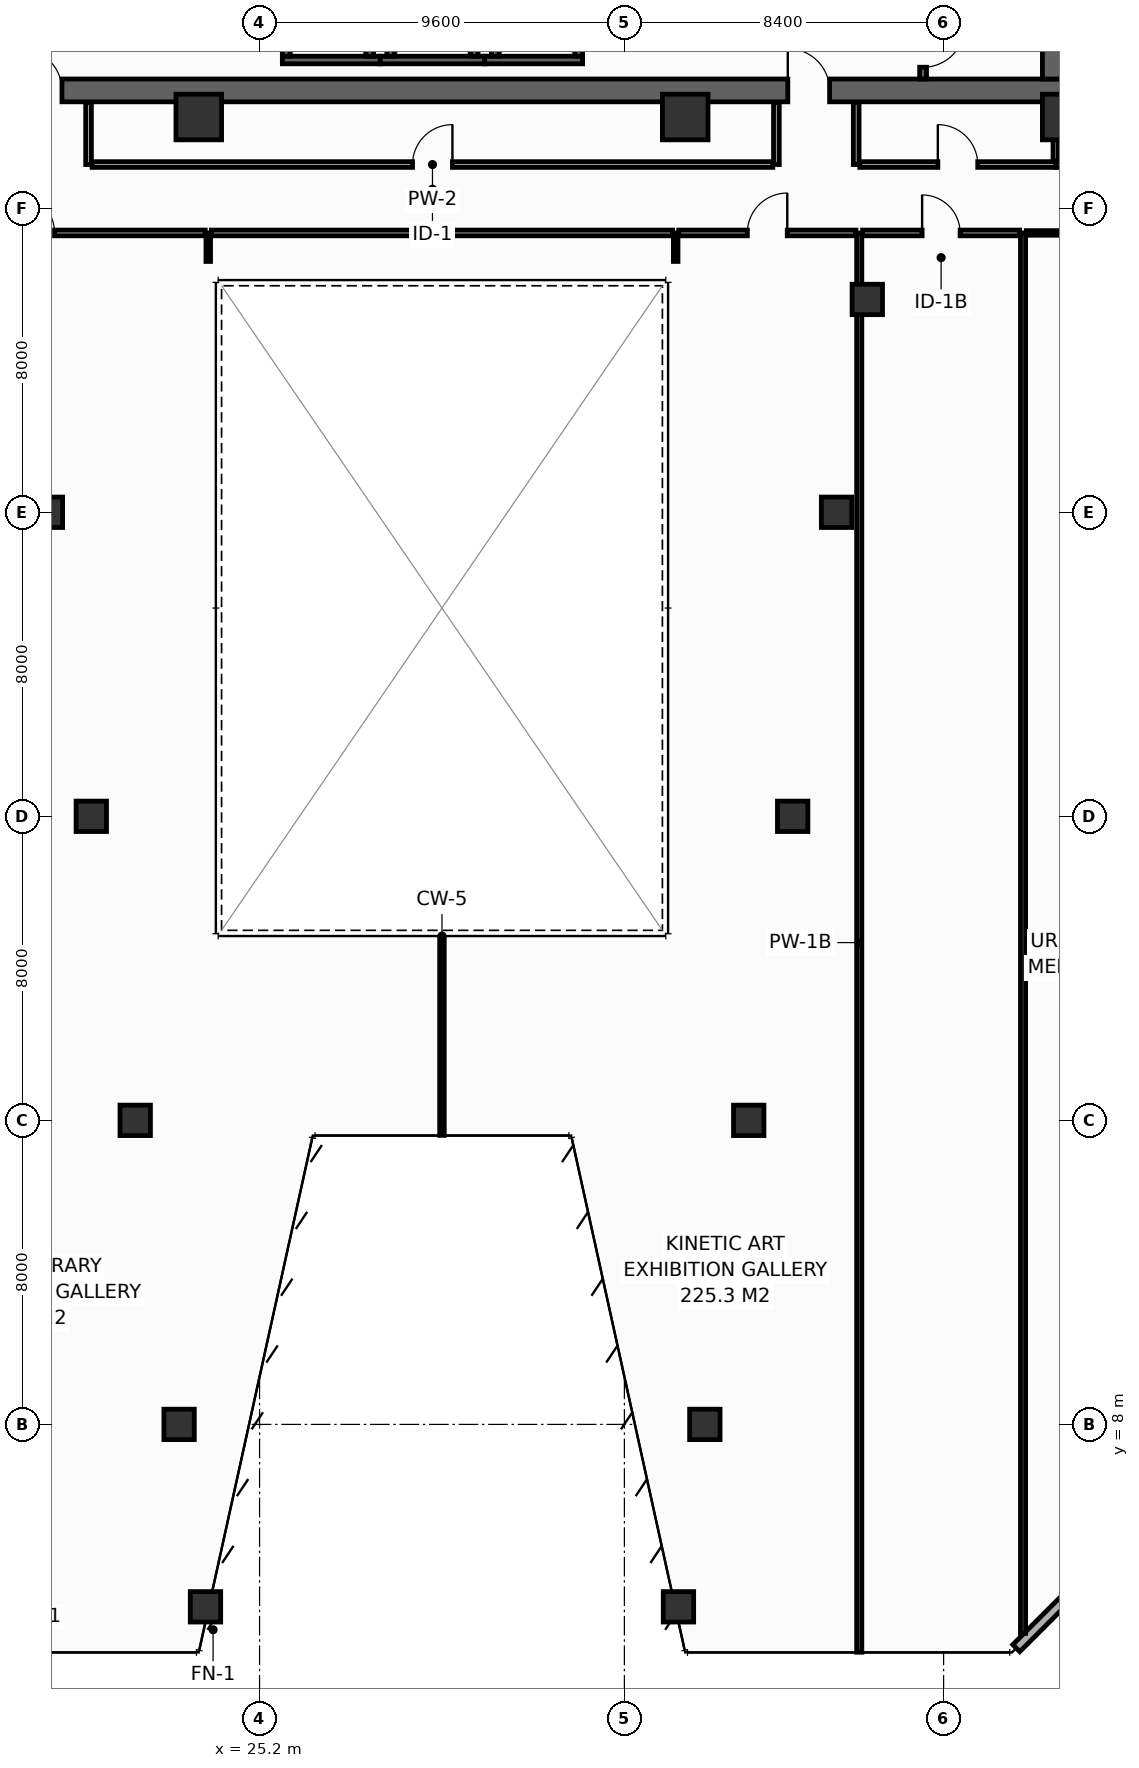
"""IFC4 building model, lengths in metres.
Left out: names, types, materials, properties, quantities, classifications, styles, units other than length and angle.
Written with IfcOpenShell. Run it as: python <this file> out.ifc"""

import sys

from ifc_helpers import new_model, si_unit, direction, frame, frame_2d, origin, origin_2d, place, context, subcontext, project, spatial, rectangle, hollow_rectangle, extrude, element, fill, save


model = new_model("IFC4")
c1 = context("Model", 3, precision=1e-05, world=origin(), true_north=direction((0.0, 1.0)))
c2 = subcontext(c1, "Body", "Model", "MODEL_VIEW")
j1 = project(units=[si_unit("LENGTHUNIT", "METRE"), si_unit("PLANEANGLEUNIT", "RADIAN")], contexts=[c1])
p1 = place(None, origin())
s1 = spatial("IfcSite", under=j1, at=p1, CompositionType="ELEMENT")
p2 = place(p1, origin())
s2 = spatial("IfcBuilding", under=s1, at=p2, CompositionType="ELEMENT")
p3 = place(p2, frame((0.0, 0.0, 56.0)))
s3 = spatial("IfcBuildingStorey", under=s2, at=p3, CompositionType="ELEMENT", Elevation=56.0)
p4 = place(p3, frame((13.5, 43.1, 0.0), z_axis=(0.0, 0.0, 1.0), x_axis=(1.0, 0.0, 0.0)))
e1 = element("IfcWall", 1, at=p4, inside=s3, PredefinedType="SHEAR", context=c2, shape_type="SweptSolid", body=[
    extrude(rectangle(XDim=32.9, YDim=0.6, at=frame_2d((16.45, 0.0))), origin(), (0.0, 0.0, 1.0), 4.15),
])
p5 = place(p4, frame((5.4, 0.0, 0.0)))
e2 = element("IfcOpeningElement", 2, at=p5, cuts=e1, PredefinedType="OPENING", context=c2, shape_type="SweptSolid", body=[
    extrude(rectangle(XDim=1.1, YDim=2.15, at=frame_2d((0.55, 1.075))), frame((0.0, 0.31, 0.0), z_axis=(0.0, -1.0, 0.0), x_axis=(1.0, 0.0, 0.0)), (0.0, 0.0, 1.0), 0.62),
])
p6 = place(p4, frame((25.6, 0.0, 0.0)))
e3 = element("IfcOpeningElement", 3, at=p6, cuts=e1, PredefinedType="OPENING", context=c2, shape_type="SweptSolid", body=[
    extrude(rectangle(XDim=1.1, YDim=2.15, at=frame_2d((0.55, 1.075))), frame((0.0, 0.31, 0.0), z_axis=(0.0, -1.0, 0.0), x_axis=(1.0, 0.0, 0.0)), (0.0, 0.0, 1.0), 0.62),
])
p7 = place(p3, frame((46.1, 43.4, 0.0), z_axis=(0.0, 0.0, 1.0), x_axis=(0.0, 1.0, 0.0)))
e4 = element("IfcWall", 4, at=p7, inside=s3, PredefinedType="SHEAR", context=c2, shape_type="SweptSolid", body=[
    extrude(rectangle(XDim=10.4, YDim=0.6, at=frame_2d((5.2, 0.0))), origin(), (0.0, 0.0, 1.0), 4.15),
])
for number, where, z_axis, x_axis in (
    (5, (23.6, 42.4, 0.0), (0.0, 0.0, 1.0), (1.0, 0.0, 0.0)),
    (6, (36.4, 42.4, 0.0), (0.0, 0.0, 1.0), (1.0, 0.0, 0.0)),
    (7, (46.4, 42.4, 0.0), (0.0, 0.0, 1.0), (1.0, 0.0, 0.0)),
):
    element("IfcColumn", number, at=place(p3, frame(where, z_axis=z_axis, x_axis=x_axis)), inside=s3, PredefinedType="COLUMN", context=c2, shape_type="SweptSolid", body=[
        extrude(hollow_rectangle(XDim=1.2, YDim=1.2, WallThickness=0.055, at=origin_2d()), origin(), (0.0, 0.0, 1.0), 4.4),
    ])
for number, where, z_axis, x_axis in (
    (8, (23.777, 3.2, 0.0), (0.0, 0.0, 1.0), (1.0, 0.0, 0.0)),
    (9, (36.223, 3.2, 0.0), (0.0, 0.0, 1.0), (1.0, 0.0, 0.0)),
    (10, (23.083, 8.0, 0.0), (0.0, 0.0, 1.0), (1.0, 0.0, 0.0)),
    (11, (36.917, 8.0, 0.0), (0.0, 0.0, 1.0), (1.0, 0.0, 0.0)),
    (12, (21.928, 16.0, 0.0), (0.0, 0.0, 1.0), (1.0, 0.0, 0.0)),
    (13, (38.072, 16.0, 0.0), (0.0, 0.0, 1.0), (1.0, 0.0, 0.0)),
    (14, (20.772, 24.0, 0.0), (0.0, 0.0, 1.0), (1.0, 0.0, 0.0)),
    (15, (39.228, 24.0, 0.0), (0.0, 0.0, 1.0), (1.0, 0.0, 0.0)),
    (16, (19.617, 32.0, 0.0), (0.0, 0.0, 1.0), (1.0, 0.0, 0.0)),
    (17, (40.383, 32.0, 0.0), (0.0, 0.0, 1.0), (1.0, 0.0, 0.0)),
    (18, (41.192, 37.6, 0.0), (0.0, 0.0, 1.0), (1.0, 0.0, 0.0)),
):
    element("IfcColumn", number, at=place(p3, frame(where, z_axis=z_axis, x_axis=x_axis)), inside=s3, PredefinedType="COLUMN", context=c2, shape_type="SweptSolid", body=[
        extrude(hollow_rectangle(XDim=0.8, YDim=0.8, WallThickness=0.036, at=origin_2d()), origin(), (0.0, 0.0, 1.0), 4.4),
    ])
p8 = place(p3, frame((25.8, 43.9, 0.0), z_axis=(0.0, 0.0, 1.0), x_axis=(1.0, 0.0, 0.0)))
e19 = element("IfcWall", 19, at=p8, inside=s3, PredefinedType="SHEAR", context=c2, shape_type="SweptSolid", body=[
    extrude(rectangle(XDim=2.575, YDim=0.2, at=frame_2d((1.288, 0.0))), origin(), (0.0, 0.0, 1.0), 4.15),
])
for number, where, z_axis, x_axis in (
    (20, (25.9, 44.0, 0.0), (0.0, 0.0, 1.0), (0.0, 1.0, 0.0)),
    (21, (28.1, 44.0, 0.0), (0.0, 0.0, 1.0), (0.0, 1.0, 0.0)),
):
    element("IfcWall", number, at=place(p3, frame(where, z_axis=z_axis, x_axis=x_axis)), inside=s3, PredefinedType="SHEAR", context=c2, shape_type="SweptSolid", body=[
        extrude(rectangle(XDim=2.3, YDim=0.2, at=frame_2d((1.15, 0.0))), origin(), (0.0, 0.0, 1.0), 4.15),
    ])
p9 = place(p3, frame((28.375, 43.9, 0.0), z_axis=(0.0, 0.0, 1.0), x_axis=(1.0, 0.0, 0.0)))
e22 = element("IfcWall", 22, at=p9, inside=s3, PredefinedType="SHEAR", context=c2, shape_type="SweptSolid", body=[
    extrude(rectangle(XDim=2.75, YDim=0.2, at=frame_2d((1.375, 0.0))), origin(), (0.0, 0.0, 1.0), 4.15),
])
for number, where, z_axis, x_axis in (
    (23, (28.65, 44.0, 0.0), (0.0, 0.0, 1.0), (0.0, 1.0, 0.0)),
    (24, (30.85, 44.0, 0.0), (0.0, 0.0, 1.0), (0.0, 1.0, 0.0)),
):
    element("IfcWall", number, at=place(p3, frame(where, z_axis=z_axis, x_axis=x_axis)), inside=s3, PredefinedType="SHEAR", context=c2, shape_type="SweptSolid", body=[
        extrude(rectangle(XDim=2.3, YDim=0.2, at=frame_2d((1.15, 0.0))), origin(), (0.0, 0.0, 1.0), 4.15),
    ])
p10 = place(p3, frame((31.125, 43.9, 0.0), z_axis=(0.0, 0.0, 1.0), x_axis=(1.0, 0.0, 0.0)))
e25 = element("IfcWall", 25, at=p10, inside=s3, PredefinedType="SHEAR", context=c2, shape_type="SweptSolid", body=[
    extrude(rectangle(XDim=2.575, YDim=0.2, at=frame_2d((1.288, 0.0))), origin(), (0.0, 0.0, 1.0), 4.15),
])
for number, where, z_axis, x_axis in (
    (26, (31.4, 44.0, 0.0), (0.0, 0.0, 1.0), (0.0, 1.0, 0.0)),
    (27, (33.6, 44.0, 0.0), (0.0, 0.0, 1.0), (0.0, 1.0, 0.0)),
):
    element("IfcWall", number, at=place(p3, frame(where, z_axis=z_axis, x_axis=x_axis)), inside=s3, PredefinedType="SHEAR", context=c2, shape_type="SweptSolid", body=[
        extrude(rectangle(XDim=2.3, YDim=0.2, at=frame_2d((1.15, 0.0))), origin(), (0.0, 0.0, 1.0), 4.15),
    ])
p11 = place(p3, frame((42.66, 53.8, 0.0), z_axis=(0.0, 0.0, 1.0), x_axis=(0.0, -1.0, 0.0)))
e28 = element("IfcWall", 28, at=p11, inside=s3, PredefinedType="SHEAR", context=c2, shape_type="SweptSolid", body=[
    extrude(rectangle(XDim=10.4, YDim=0.18, at=frame_2d((5.2, 0.0))), origin(), (0.0, 0.0, 1.0), 4.15),
])
p12 = place(p11, frame((8.99, 0.0, 0.0)))
e29 = element("IfcOpeningElement", 29, at=p12, cuts=e28, PredefinedType="OPENING", context=c2, shape_type="SweptSolid", body=[
    extrude(rectangle(XDim=1.1, YDim=2.15, at=frame_2d((0.55, 1.075))), frame((0.0, 0.1, 0.0), z_axis=(0.0, -1.0, 0.0), x_axis=(1.0, 0.0, 0.0)), (0.0, 0.0, 1.0), 0.2),
])
p13 = place(p3, frame((45.113, 2.113, 0.0), z_axis=(0.0, 0.0, 1.0), x_axis=(0.707106781187, 0.707106781187, 0.0)))
e30 = element("IfcWall", 30, at=p13, inside=s3, PredefinedType="STANDARD", context=c2, shape_type="SweptSolid", body=[
    extrude(rectangle(XDim=4.206, YDim=0.26, at=frame_2d((2.103, 0.0))), origin(), (0.0, 0.0, 1.0), 4.15),
])
p14 = place(p3, frame((46.15, 41.15, 0.0), z_axis=(0.0, 0.0, 1.0), x_axis=(1.0, 0.0, 0.0)))
e31 = element("IfcWall", 31, at=p14, inside=s3, PredefinedType="PARTITIONING", context=c2, shape_type="SweptSolid", body=[
    extrude(rectangle(XDim=4.05, YDim=0.14, at=frame_2d((2.025, 0.0))), origin(), (0.0, 0.0, 1.0), 4.15),
])
p15 = place(p3, frame((46.15, 41.24, 0.0), z_axis=(0.0, 0.0, 1.0), x_axis=(0.0, 1.0, 0.0)))
e32 = element("IfcWall", 32, at=p15, inside=s3, PredefinedType="PARTITIONING", context=c2, shape_type="SweptSolid", body=[
    extrude(rectangle(XDim=1.54, YDim=0.14, at=frame_2d((0.77, 0.0))), origin(), (0.0, 0.0, 1.0), 4.15),
])
for number, where, z_axis, x_axis in (
    (33, (20.7, 41.15, 0.0), (0.0, 0.0, 1.0), (0.0, 1.0, 0.0)),
    (34, (38.8, 41.15, 0.0), (0.0, 0.0, 1.0), (0.0, 1.0, 0.0)),
    (35, (40.9, 41.15, 0.0), (0.0, 0.0, 1.0), (0.0, 1.0, 0.0)),
):
    element("IfcWall", number, at=place(p3, frame(where, z_axis=z_axis, x_axis=x_axis)), inside=s3, PredefinedType="PARTITIONING", context=c2, shape_type="SweptSolid", body=[
        extrude(rectangle(XDim=1.63, YDim=0.15, at=frame_2d((0.815, 0.0))), origin(), (0.0, 0.0, 1.0), 4.15),
    ])
p16 = place(p3, frame((20.795, 41.15, 0.0), z_axis=(0.0, 0.0, 1.0), x_axis=(1.0, 0.0, 0.0)))
e36 = element("IfcWall", 36, at=p16, inside=s3, PredefinedType="PARTITIONING", context=c2, shape_type="SweptSolid", body=[
    extrude(rectangle(XDim=17.91, YDim=0.15, at=frame_2d((8.955, 0.0))), origin(), (0.0, 0.0, 1.0), 3.335),
])
p17 = place(p16, frame((8.43, 0.0, 0.0)))
e37 = element("IfcOpeningElement", 37, at=p17, cuts=e36, PredefinedType="OPENING", context=c2, shape_type="SweptSolid", body=[
    extrude(rectangle(XDim=1.05, YDim=2.15, at=frame_2d((0.525, 1.075))), frame((0.0, 0.085, 0.0), z_axis=(0.0, -1.0, 0.0), x_axis=(1.0, 0.0, 0.0)), (0.0, 0.0, 1.0), 0.17),
])
p18 = place(p3, frame((40.995, 41.15, 0.0), z_axis=(0.0, 0.0, 1.0), x_axis=(1.0, 0.0, 0.0)))
e38 = element("IfcWall", 38, at=p18, inside=s3, PredefinedType="PARTITIONING", context=c2, shape_type="SweptSolid", body=[
    extrude(rectangle(XDim=5.155, YDim=0.15, at=frame_2d((2.577, 0.0))), origin(), (0.0, 0.0, 1.0), 4.15),
])
p19 = place(p18, frame((2.053, 0.0, 0.0)))
e39 = element("IfcOpeningElement", 39, at=p19, cuts=e38, PredefinedType="OPENING", context=c2, shape_type="SweptSolid", body=[
    extrude(rectangle(XDim=1.05, YDim=2.15, at=frame_2d((0.525, 1.075))), frame((0.0, 0.085, 0.0), z_axis=(0.0, -1.0, 0.0), x_axis=(1.0, 0.0, 0.0)), (0.0, 0.0, 1.0), 0.17),
])
p20 = place(p3, frame((40.98, 2.005, 0.0), z_axis=(0.0, 0.0, 1.0), x_axis=(0.0, 1.0, 0.0)))
e40 = element("IfcWall", 40, at=p20, inside=s3, PredefinedType="PARTITIONING", context=c2, shape_type="SweptSolid", body=[
    extrude(rectangle(XDim=37.345, YDim=0.135, at=frame_2d((18.673, 0.0))), origin(), (0.0, 0.0, 1.0), 3.335),
])
p21 = place(p3, frame((45.29, 2.502, 0.0), z_axis=(0.0, 0.0, 1.0), x_axis=(0.0, 1.0, 0.0)))
e41 = element("IfcWall", 41, at=p21, inside=s3, PredefinedType="PARTITIONING", context=c2, shape_type="SweptSolid", body=[
    extrude(rectangle(XDim=36.848, YDim=0.135, at=frame_2d((18.424, 0.0))), origin(), (0.0, 0.0, 1.0), 3.335),
])
for number, where, z_axis, x_axis in (
    (42, (23.85, 38.6, 0.0), (0.0, 0.0, 1.0), (0.0, 1.0, 0.0)),
    (43, (36.15, 38.6, 0.0), (0.0, 0.0, 1.0), (0.0, 1.0, 0.0)),
):
    element("IfcWall", number, at=place(p3, frame(where, z_axis=z_axis, x_axis=x_axis)), inside=s3, PredefinedType="PARTITIONING", context=c2, shape_type="SweptSolid", body=[
        extrude(rectangle(XDim=0.75, YDim=0.12, at=frame_2d((0.375, 0.0))), origin(), (0.0, 0.0, 1.0), 3.335),
    ])
p22 = place(p3, frame((30.0, 15.605, 0.0), z_axis=(0.0, 0.0, 1.0), x_axis=(0.0, 1.0, 0.0)))
e44 = element("IfcWall", 44, at=p22, inside=s3, PredefinedType="PARTITIONING", context=c2, shape_type="SweptSolid", body=[
    extrude(rectangle(XDim=5.175, YDim=0.12, at=frame_2d((2.587, 0.0))), origin(), (0.0, 0.0, 1.0), 4.15),
])
p23 = place(p3, frame((14.79, 39.35, 0.0), z_axis=(0.0, 0.0, 1.0), x_axis=(1.0, 0.0, 0.0)))
e45 = element("IfcWall", 45, at=p23, inside=s3, PredefinedType="PARTITIONING", context=c2, shape_type="SweptSolid", body=[
    extrude(rectangle(XDim=8.98, YDim=0.15, at=frame_2d((4.49, 0.0))), origin(), (0.0, 0.0, 1.0), 3.335),
])
p24 = place(p23, frame((3.965, 0.0, 0.0)))
e46 = element("IfcOpeningElement", 46, at=p24, cuts=e45, PredefinedType="OPENING", context=c2, shape_type="SweptSolid", body=[
    extrude(rectangle(XDim=1.05, YDim=2.15, at=frame_2d((0.525, 1.075))), frame((0.0, 0.085, 0.0), z_axis=(0.0, -1.0, 0.0), x_axis=(1.0, 0.0, 0.0)), (0.0, 0.0, 1.0), 0.17),
])
p25 = place(p3, frame((23.93, 39.35, 0.0), z_axis=(0.0, 0.0, 1.0), x_axis=(1.0, 0.0, 0.0)))
e47 = element("IfcWall", 47, at=p25, inside=s3, PredefinedType="PARTITIONING", context=c2, shape_type="SweptSolid", body=[
    extrude(rectangle(XDim=12.14, YDim=0.15, at=frame_2d((6.07, 0.0))), origin(), (0.0, 0.0, 1.0), 4.15),
])
p26 = place(p3, frame((36.23, 39.35, 0.0), z_axis=(0.0, 0.0, 1.0), x_axis=(1.0, 0.0, 0.0)))
e48 = element("IfcWall", 48, at=p26, inside=s3, PredefinedType="PARTITIONING", context=c2, shape_type="SweptSolid", body=[
    extrude(rectangle(XDim=4.663, YDim=0.15, at=frame_2d((2.331, 0.0))), origin(), (0.0, 0.0, 1.0), 3.335),
])
p27 = place(p26, frame((1.806, 0.0, 0.0)))
e49 = element("IfcOpeningElement", 49, at=p27, cuts=e48, PredefinedType="OPENING", context=c2, shape_type="SweptSolid", body=[
    extrude(rectangle(XDim=1.05, YDim=2.15, at=frame_2d((0.525, 1.075))), frame((0.0, 0.085, 0.0), z_axis=(0.0, -1.0, 0.0), x_axis=(1.0, 0.0, 0.0)), (0.0, 0.0, 1.0), 0.17),
])
p28 = place(p3, frame((41.067, 39.35, 0.0), z_axis=(0.0, 0.0, 1.0), x_axis=(1.0, 0.0, 0.0)))
e50 = element("IfcWall", 50, at=p28, inside=s3, PredefinedType="PARTITIONING", context=c2, shape_type="SweptSolid", body=[
    extrude(rectangle(XDim=4.135, YDim=0.15, at=frame_2d((2.067, 0.0))), origin(), (0.0, 0.0, 1.0), 4.15),
])
p29 = place(p28, frame((1.567, 0.0, 0.0)))
e51 = element("IfcOpeningElement", 51, at=p29, cuts=e50, PredefinedType="OPENING", context=c2, shape_type="SweptSolid", body=[
    extrude(rectangle(XDim=1.0, YDim=2.15, at=frame_2d((0.5, 1.075))), frame((0.0, 0.085, 0.0), z_axis=(0.0, -1.0, 0.0), x_axis=(1.0, 0.0, 0.0)), (0.0, 0.0, 1.0), 0.17),
])
p30 = place(p3, frame((45.377, 39.35, 0.0), z_axis=(0.0, 0.0, 1.0), x_axis=(1.0, 0.0, 0.0)))
e52 = element("IfcWall", 52, at=p30, inside=s3, PredefinedType="PARTITIONING", context=c2, shape_type="SweptSolid", body=[
    extrude(rectangle(XDim=4.135, YDim=0.12, at=frame_2d((2.067, 0.0))), origin(), (0.0, 0.0, 1.0), 4.15),
])
p31 = place(p30, frame((1.618, 0.0, 0.0)))
e53 = element("IfcOpeningElement", 53, at=p31, cuts=e52, PredefinedType="OPENING", context=c2, shape_type="SweptSolid", body=[
    extrude(rectangle(XDim=0.9, YDim=2.1, at=frame_2d((0.45, 1.05))), frame((0.0, 0.07, 0.0), z_axis=(0.0, -1.0, 0.0), x_axis=(1.0, 0.0, 0.0)), (0.0, 0.0, 1.0), 0.14),
])
p32 = place(p12, origin())
e54 = element("IfcDoor", 54, at=p32, inside=s3, OperationType="SINGLE_SWING_LEFT", PredefinedType="DOOR", context=c2, shape_type="SweptSolid", body=[
    extrude(rectangle(XDim=1.1, YDim=2.15, at=frame_2d((0.55, 1.075))), frame((0.0, 0.025, 0.0), z_axis=(0.0, -1.0, 0.0), x_axis=(1.0, 0.0, 0.0)), (0.0, 0.0, 1.0), 0.05),
])
fill(e29, e54)
p33 = place(p5, origin())
e55 = element("IfcDoor", 55, at=p33, inside=s3, OperationType="SINGLE_SWING_LEFT", PredefinedType="DOOR", context=c2, shape_type="SweptSolid", body=[
    extrude(rectangle(XDim=1.1, YDim=2.15, at=frame_2d((0.55, 1.075))), frame((0.0, 0.025, 0.0), z_axis=(0.0, -1.0, 0.0), x_axis=(1.0, 0.0, 0.0)), (0.0, 0.0, 1.0), 0.05),
])
fill(e2, e55)
p34 = place(p6, origin())
e56 = element("IfcDoor", 56, at=p34, inside=s3, OperationType="SINGLE_SWING_LEFT", PredefinedType="DOOR", context=c2, shape_type="SweptSolid", body=[
    extrude(rectangle(XDim=1.1, YDim=2.15, at=frame_2d((0.55, 1.075))), frame((0.0, 0.025, 0.0), z_axis=(0.0, -1.0, 0.0), x_axis=(1.0, 0.0, 0.0)), (0.0, 0.0, 1.0), 0.05),
])
fill(e3, e56)
p35 = place(p17, origin())
e57 = element("IfcDoor", 57, at=p35, inside=s3, OperationType="SINGLE_SWING_RIGHT", PredefinedType="DOOR", context=c2, shape_type="SweptSolid", body=[
    extrude(rectangle(XDim=1.05, YDim=2.15, at=frame_2d((0.525, 1.075))), frame((0.0, 0.025, 0.0), z_axis=(0.0, -1.0, 0.0), x_axis=(1.0, 0.0, 0.0)), (0.0, 0.0, 1.0), 0.05),
])
fill(e37, e57)
p36 = place(p19, origin())
e58 = element("IfcDoor", 58, at=p36, inside=s3, OperationType="SINGLE_SWING_LEFT", PredefinedType="DOOR", context=c2, shape_type="SweptSolid", body=[
    extrude(rectangle(XDim=1.05, YDim=2.15, at=frame_2d((0.525, 1.075))), frame((0.0, 0.025, 0.0), z_axis=(0.0, -1.0, 0.0), x_axis=(1.0, 0.0, 0.0)), (0.0, 0.0, 1.0), 0.05),
])
fill(e39, e58)
p37 = place(p24, origin())
e59 = element("IfcDoor", 59, at=p37, inside=s3, OperationType="SINGLE_SWING_LEFT", PredefinedType="DOOR", context=c2, shape_type="SweptSolid", body=[
    extrude(rectangle(XDim=1.05, YDim=2.15, at=frame_2d((0.525, 1.075))), frame((0.0, 0.025, 0.0), z_axis=(0.0, -1.0, 0.0), x_axis=(1.0, 0.0, 0.0)), (0.0, 0.0, 1.0), 0.05),
])
fill(e46, e59)
p38 = place(p27, origin())
e60 = element("IfcDoor", 60, at=p38, inside=s3, OperationType="SINGLE_SWING_RIGHT", PredefinedType="DOOR", context=c2, shape_type="SweptSolid", body=[
    extrude(rectangle(XDim=1.05, YDim=2.15, at=frame_2d((0.525, 1.075))), frame((0.0, 0.025, 0.0), z_axis=(0.0, -1.0, 0.0), x_axis=(1.0, 0.0, 0.0)), (0.0, 0.0, 1.0), 0.05),
])
fill(e49, e60)
p39 = place(p29, origin())
e61 = element("IfcDoor", 61, at=p39, inside=s3, OperationType="SINGLE_SWING_LEFT", PredefinedType="DOOR", context=c2, shape_type="SweptSolid", body=[
    extrude(rectangle(XDim=1.0, YDim=2.15, at=frame_2d((0.5, 1.075))), frame((0.0, 0.025, 0.0), z_axis=(0.0, -1.0, 0.0), x_axis=(1.0, 0.0, 0.0)), (0.0, 0.0, 1.0), 0.05),
])
fill(e51, e61)
save(model, sys.argv[1])
